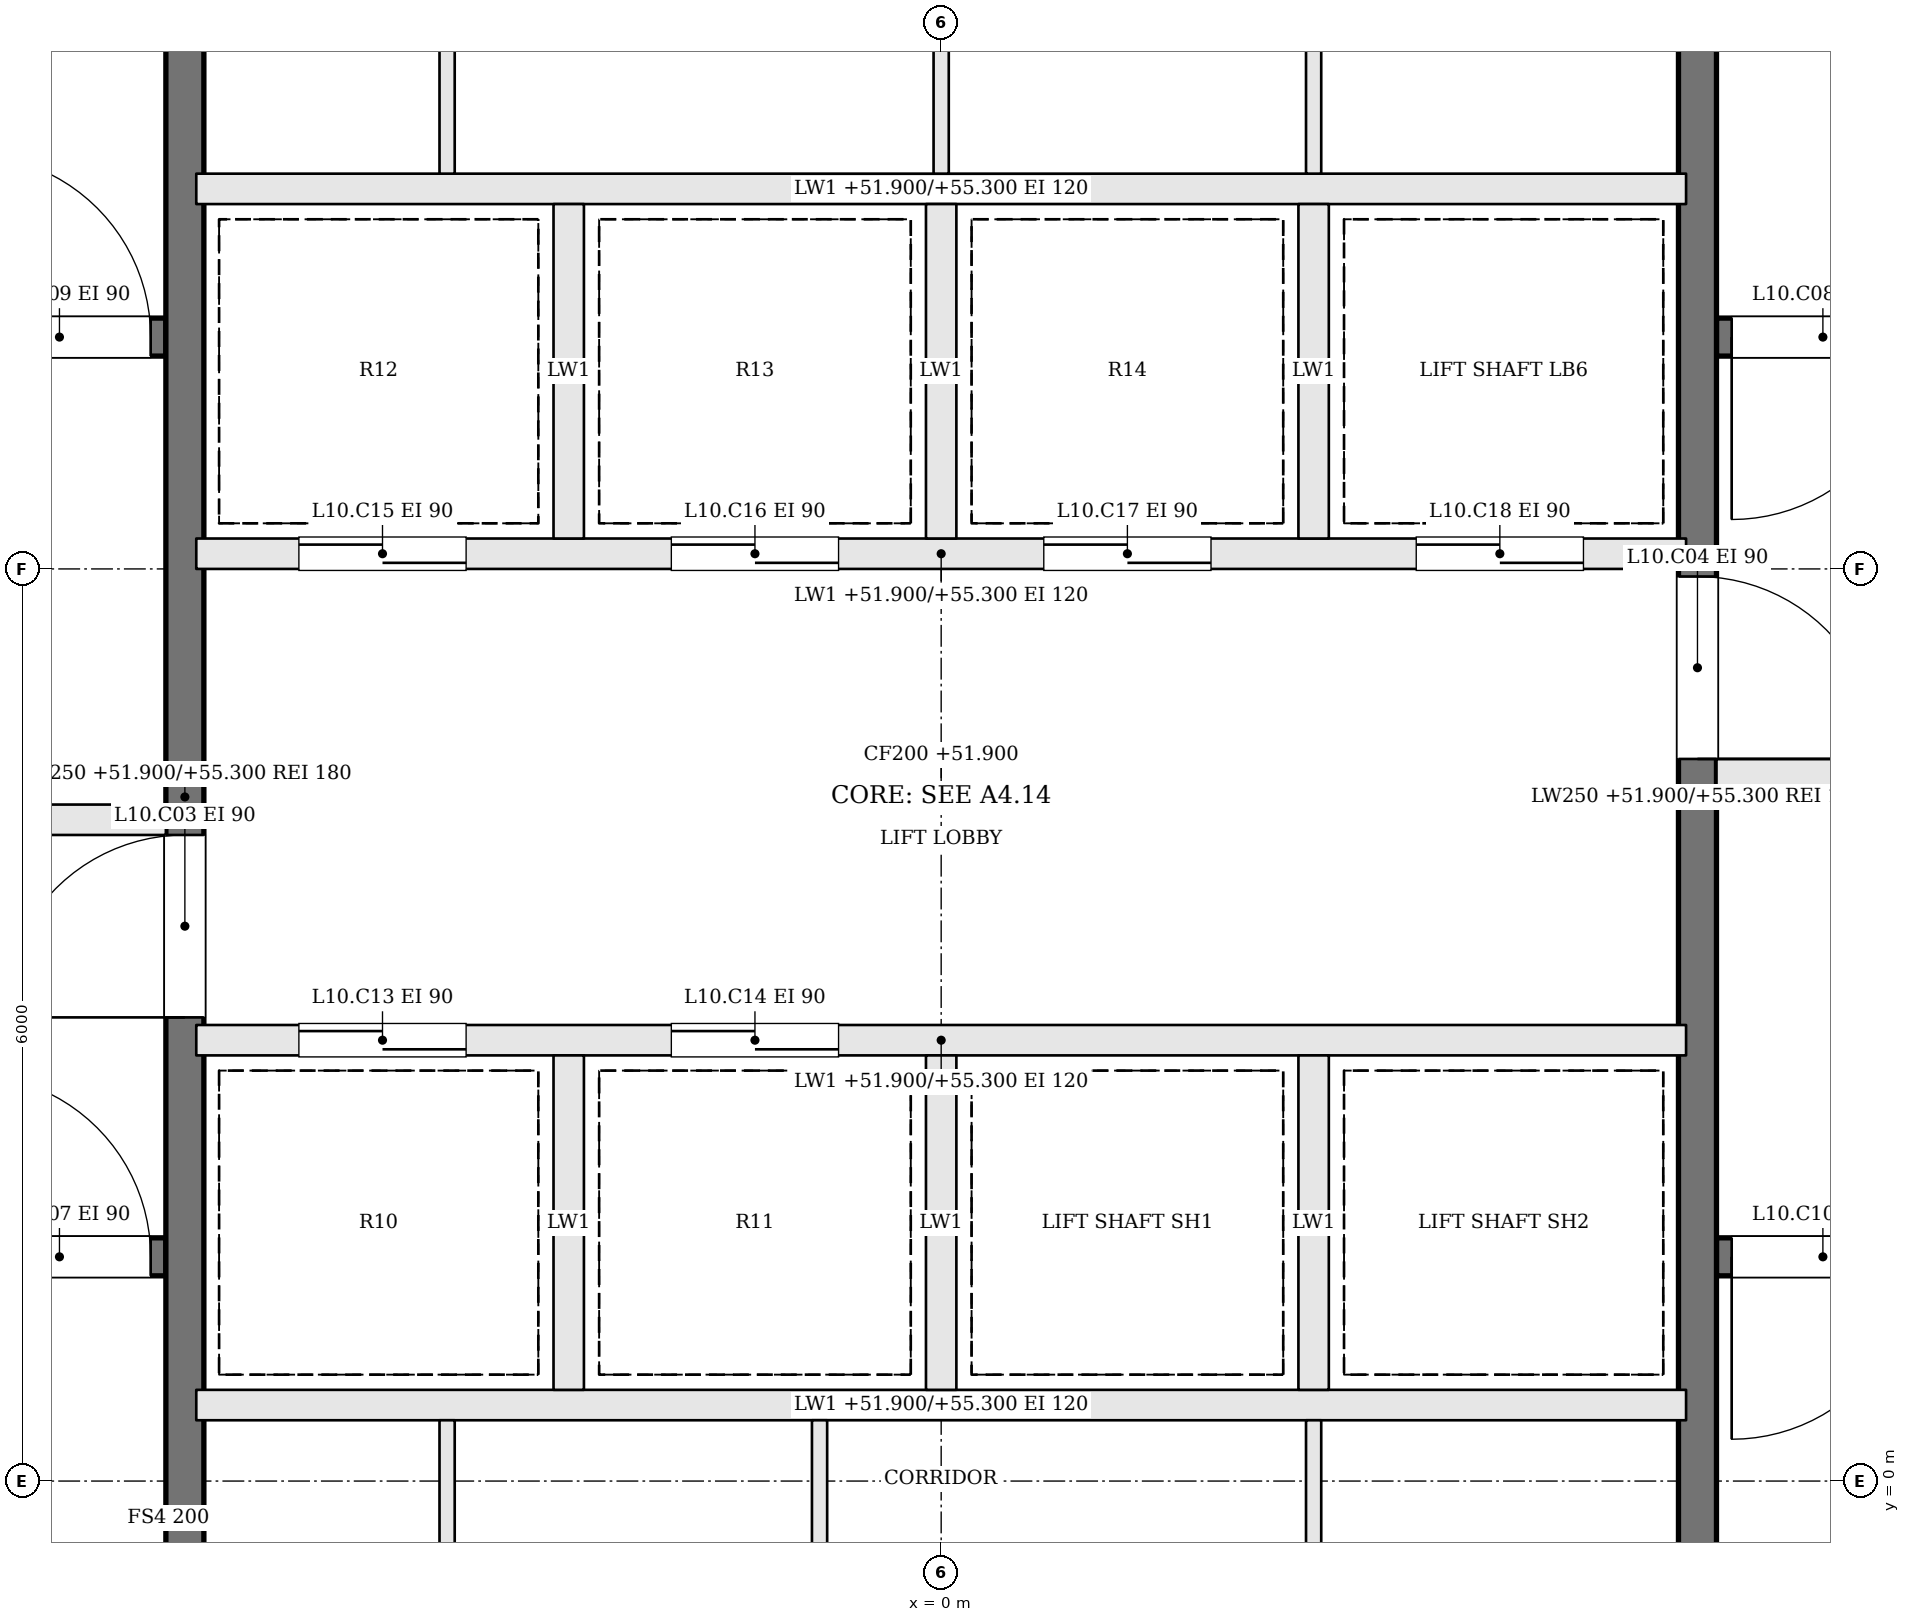
"""IFC4 building model, lengths in metres.
Left out: names, types, materials, properties, quantities, classifications, styles, units other than length and angle.
Written with IfcOpenShell. Run it as: python <this file> out.ifc"""

import sys

from ifc_helpers import new_model, si_unit, direction, frame, frame_2d, origin, place, context, subcontext, project, spatial, rectangle, extrude, element, fill, save


model = new_model("IFC4")
c1 = context("Model", 3, precision=1e-05, world=origin(), true_north=direction((0.0, 1.0)))
c2 = subcontext(c1, "Body", "Model", "MODEL_VIEW")
j1 = project(units=[si_unit("LENGTHUNIT", "METRE"), si_unit("PLANEANGLEUNIT", "RADIAN")], contexts=[c1])
p1 = place(None, origin())
s1 = spatial("IfcSite", under=j1, at=p1, CompositionType="ELEMENT")
p2 = place(p1, origin())
s2 = spatial("IfcBuilding", under=s1, at=p2, CompositionType="ELEMENT")
p3 = place(p2, frame((0.0, 0.0, 51.9)))
s3 = spatial("IfcBuildingStorey", under=s2, at=p3, CompositionType="ELEMENT", Elevation=51.9)
p4 = place(p3, frame((-11.6, 1.475, 0.0), z_axis=(0.0, 0.0, 1.0), x_axis=(1.0, 0.0, 0.0)))
e1 = element("IfcWall", 1, at=p4, inside=s3, PredefinedType="SOLIDWALL", context=c2, shape_type="SweptSolid", body=[
    extrude(rectangle(XDim=6.5, YDim=0.25, at=frame_2d((3.25, 0.0))), origin(), (0.0, 0.0, 1.0), 3.4),
])
p5 = place(p4, frame((5.2, 0.0, 0.0)))
e2 = element("IfcOpeningElement", 2, at=p5, cuts=e1, PredefinedType="OPENING", context=c2, shape_type="SweptSolid", body=[
    extrude(rectangle(XDim=1.2, YDim=2.1, at=frame_2d((0.6, 1.05))), frame((0.0, 0.135, 0.0), z_axis=(0.0, -1.0, 0.0), x_axis=(1.0, 0.0, 0.0)), (0.0, 0.0, 1.0), 0.27),
])
p6 = place(p3, frame((11.6, 7.525, 0.0), z_axis=(0.0, 0.0, 1.0), x_axis=(-1.0, 0.0, 0.0)))
e3 = element("IfcWall", 3, at=p6, inside=s3, PredefinedType="SOLIDWALL", context=c2, shape_type="SweptSolid", body=[
    extrude(rectangle(XDim=6.5, YDim=0.25, at=frame_2d((3.25, 0.0))), origin(), (0.0, 0.0, 1.0), 3.4),
])
p7 = place(p6, frame((5.2, 0.0, 0.0)))
e4 = element("IfcOpeningElement", 4, at=p7, cuts=e3, PredefinedType="OPENING", context=c2, shape_type="SweptSolid", body=[
    extrude(rectangle(XDim=1.2, YDim=2.1, at=frame_2d((0.6, 1.05))), frame((0.0, 0.135, 0.0), z_axis=(0.0, -1.0, 0.0), x_axis=(1.0, 0.0, 0.0)), (0.0, 0.0, 1.0), 0.27),
])
p8 = place(p3, frame((-11.6, 4.35, 0.0), z_axis=(0.0, 0.0, 1.0), x_axis=(1.0, 0.0, 0.0)))
e5 = element("IfcWall", 5, at=p8, inside=s3, PredefinedType="SOLIDWALL", context=c2, shape_type="SweptSolid", body=[
    extrude(rectangle(XDim=6.5, YDim=0.2, at=frame_2d((3.25, 0.0))), origin(), (0.0, 0.0, 1.0), 3.4),
])
p9 = place(p8, frame((3.8, 0.0, 0.0)))
e6 = element("IfcOpeningElement", 6, at=p9, cuts=e5, PredefinedType="OPENING", context=c2, shape_type="SweptSolid", body=[
    extrude(rectangle(XDim=1.2, YDim=2.1, at=frame_2d((0.6, 1.05))), frame((0.0, 0.11, 0.0), z_axis=(0.0, -1.0, 0.0), x_axis=(1.0, 0.0, 0.0)), (0.0, 0.0, 1.0), 0.22),
])
p10 = place(p8, frame((0.5, 0.0, 0.0)))
e7 = element("IfcOpeningElement", 7, at=p10, cuts=e5, PredefinedType="OPENING", context=c2, shape_type="SweptSolid", body=[
    extrude(rectangle(XDim=1.2, YDim=2.1, at=frame_2d((0.6, 1.05))), frame((0.0, 0.11, 0.0), z_axis=(0.0, -1.0, 0.0), x_axis=(1.0, 0.0, 0.0)), (0.0, 0.0, 1.0), 0.22),
])
p11 = place(p3, frame((11.6, 4.65, 0.0), z_axis=(0.0, 0.0, 1.0), x_axis=(-1.0, 0.0, 0.0)))
e8 = element("IfcWall", 8, at=p11, inside=s3, PredefinedType="SOLIDWALL", context=c2, shape_type="SweptSolid", body=[
    extrude(rectangle(XDim=6.5, YDim=0.2, at=frame_2d((3.25, 0.0))), origin(), (0.0, 0.0, 1.0), 3.4),
])
p12 = place(p11, frame((3.8, 0.0, 0.0)))
e9 = element("IfcOpeningElement", 9, at=p12, cuts=e8, PredefinedType="OPENING", context=c2, shape_type="SweptSolid", body=[
    extrude(rectangle(XDim=1.2, YDim=2.1, at=frame_2d((0.6, 1.05))), frame((0.0, 0.11, 0.0), z_axis=(0.0, -1.0, 0.0), x_axis=(1.0, 0.0, 0.0)), (0.0, 0.0, 1.0), 0.22),
])
p13 = place(p11, frame((0.5, 0.0, 0.0)))
e10 = element("IfcOpeningElement", 10, at=p13, cuts=e8, PredefinedType="OPENING", context=c2, shape_type="SweptSolid", body=[
    extrude(rectangle(XDim=1.2, YDim=2.1, at=frame_2d((0.6, 1.05))), frame((0.0, 0.11, 0.0), z_axis=(0.0, -1.0, 0.0), x_axis=(1.0, 0.0, 0.0)), (0.0, 0.0, 1.0), 0.22),
])
p14 = place(p3, frame((-11.6, 7.525, 0.0), z_axis=(0.0, 0.0, 1.0), x_axis=(1.0, 0.0, 0.0)))
e11 = element("IfcWall", 11, at=p14, inside=s3, PredefinedType="SOLIDWALL", context=c2, shape_type="SweptSolid", body=[
    extrude(rectangle(XDim=6.5, YDim=0.25, at=frame_2d((3.25, 0.0))), origin(), (0.0, 0.0, 1.0), 3.4),
])
p15 = place(p14, frame((5.2, 0.0, 0.0)))
e12 = element("IfcOpeningElement", 12, at=p15, cuts=e11, PredefinedType="OPENING", context=c2, shape_type="SweptSolid", body=[
    extrude(rectangle(XDim=1.2, YDim=2.1, at=frame_2d((0.6, 1.05))), frame((0.0, 0.135, 0.0), z_axis=(0.0, -1.0, 0.0), x_axis=(1.0, 0.0, 0.0)), (0.0, 0.0, 1.0), 0.27),
])
p16 = place(p3, frame((11.6, 1.475, 0.0), z_axis=(0.0, 0.0, 1.0), x_axis=(-1.0, 0.0, 0.0)))
e13 = element("IfcWall", 13, at=p16, inside=s3, PredefinedType="SOLIDWALL", context=c2, shape_type="SweptSolid", body=[
    extrude(rectangle(XDim=6.5, YDim=0.25, at=frame_2d((3.25, 0.0))), origin(), (0.0, 0.0, 1.0), 3.4),
])
p17 = place(p16, frame((5.2, 0.0, 0.0)))
e14 = element("IfcOpeningElement", 14, at=p17, cuts=e13, PredefinedType="OPENING", context=c2, shape_type="SweptSolid", body=[
    extrude(rectangle(XDim=1.2, YDim=2.1, at=frame_2d((0.6, 1.05))), frame((0.0, 0.135, 0.0), z_axis=(0.0, -1.0, 0.0), x_axis=(1.0, 0.0, 0.0)), (0.0, 0.0, 1.0), 0.27),
])
p18 = place(p3, frame((-4.975, -1.6, 0.0), z_axis=(0.0, 0.0, 1.0), x_axis=(0.0, 1.0, 0.0)))
e15 = element("IfcWall", 15, at=p18, inside=s3, PredefinedType="SOLIDWALL", context=c2, shape_type="SweptSolid", body=[
    extrude(rectangle(XDim=12.2, YDim=0.25, at=frame_2d((6.1, 0.0))), origin(), (0.0, 0.0, 1.0), 3.4),
])
p19 = place(p18, frame((4.65, 0.0, 0.0)))
e16 = element("IfcOpeningElement", 16, at=p19, cuts=e15, PredefinedType="OPENING", context=c2, shape_type="SweptSolid", body=[
    extrude(rectangle(XDim=1.2, YDim=2.1, at=frame_2d((0.6, 1.05))), frame((0.0, 0.135, 0.0), z_axis=(0.0, -1.0, 0.0), x_axis=(1.0, 0.0, 0.0)), (0.0, 0.0, 1.0), 0.27),
])
p20 = place(p3, frame((4.975, 10.6, 0.0), z_axis=(0.0, 0.0, 1.0), x_axis=(0.0, -1.0, 0.0)))
e17 = element("IfcWall", 17, at=p20, inside=s3, PredefinedType="SOLIDWALL", context=c2, shape_type="SweptSolid", body=[
    extrude(rectangle(XDim=12.2, YDim=0.25, at=frame_2d((6.1, 0.0))), origin(), (0.0, 0.0, 1.0), 3.4),
])
p21 = place(p20, frame((4.65, 0.0, 0.0)))
e18 = element("IfcOpeningElement", 18, at=p21, cuts=e17, PredefinedType="OPENING", context=c2, shape_type="SweptSolid", body=[
    extrude(rectangle(XDim=1.2, YDim=2.1, at=frame_2d((0.6, 1.05))), frame((0.0, 0.135, 0.0), z_axis=(0.0, -1.0, 0.0), x_axis=(1.0, 0.0, 0.0)), (0.0, 0.0, 1.0), 0.27),
])
p22 = place(p3, frame((-4.9, 0.5, 0.0), z_axis=(0.0, 0.0, 1.0), x_axis=(1.0, 0.0, 0.0)))
e19 = element("IfcWall", 19, at=p22, inside=s3, PredefinedType="SOLIDWALL", context=c2, shape_type="SweptSolid", body=[
    extrude(rectangle(XDim=9.8, YDim=0.2, at=frame_2d((4.9, 0.0))), origin(), (0.0, 0.0, 1.0), 3.4),
])
p23 = place(p3, frame((-4.9, 2.9, 0.0), z_axis=(0.0, 0.0, 1.0), x_axis=(1.0, 0.0, 0.0)))
e20 = element("IfcWall", 20, at=p23, inside=s3, PredefinedType="SOLIDWALL", context=c2, shape_type="SweptSolid", body=[
    extrude(rectangle(XDim=9.8, YDim=0.2, at=frame_2d((4.9, 0.0))), origin(), (0.0, 0.0, 1.0), 3.4),
])
p24 = place(p23, frame((0.675, 0.0, 0.0)))
e21 = element("IfcOpeningElement", 21, at=p24, cuts=e20, PredefinedType="OPENING", context=c2, shape_type="SweptSolid", body=[
    extrude(rectangle(XDim=1.1, YDim=2.1, at=frame_2d((0.55, 1.05))), frame((0.0, 0.11, 0.0), z_axis=(0.0, -1.0, 0.0), x_axis=(1.0, 0.0, 0.0)), (0.0, 0.0, 1.0), 0.22),
])
p25 = place(p23, frame((3.125, 0.0, 0.0)))
e22 = element("IfcOpeningElement", 22, at=p25, cuts=e20, PredefinedType="OPENING", context=c2, shape_type="SweptSolid", body=[
    extrude(rectangle(XDim=1.1, YDim=2.1, at=frame_2d((0.55, 1.05))), frame((0.0, 0.11, 0.0), z_axis=(0.0, -1.0, 0.0), x_axis=(1.0, 0.0, 0.0)), (0.0, 0.0, 1.0), 0.22),
])
p26 = place(p3, frame((-4.9, 6.1, 0.0), z_axis=(0.0, 0.0, 1.0), x_axis=(1.0, 0.0, 0.0)))
e23 = element("IfcWall", 23, at=p26, inside=s3, PredefinedType="SOLIDWALL", context=c2, shape_type="SweptSolid", body=[
    extrude(rectangle(XDim=9.8, YDim=0.2, at=frame_2d((4.9, 0.0))), origin(), (0.0, 0.0, 1.0), 3.4),
])
p27 = place(p26, frame((0.675, 0.0, 0.0)))
e24 = element("IfcOpeningElement", 24, at=p27, cuts=e23, PredefinedType="OPENING", context=c2, shape_type="SweptSolid", body=[
    extrude(rectangle(XDim=1.1, YDim=2.1, at=frame_2d((0.55, 1.05))), frame((0.0, 0.11, 0.0), z_axis=(0.0, -1.0, 0.0), x_axis=(1.0, 0.0, 0.0)), (0.0, 0.0, 1.0), 0.22),
])
p28 = place(p26, frame((3.125, 0.0, 0.0)))
e25 = element("IfcOpeningElement", 25, at=p28, cuts=e23, PredefinedType="OPENING", context=c2, shape_type="SweptSolid", body=[
    extrude(rectangle(XDim=1.1, YDim=2.1, at=frame_2d((0.55, 1.05))), frame((0.0, 0.11, 0.0), z_axis=(0.0, -1.0, 0.0), x_axis=(1.0, 0.0, 0.0)), (0.0, 0.0, 1.0), 0.22),
])
p29 = place(p26, frame((5.575, 0.0, 0.0)))
e26 = element("IfcOpeningElement", 26, at=p29, cuts=e23, PredefinedType="OPENING", context=c2, shape_type="SweptSolid", body=[
    extrude(rectangle(XDim=1.1, YDim=2.1, at=frame_2d((0.55, 1.05))), frame((0.0, 0.11, 0.0), z_axis=(0.0, -1.0, 0.0), x_axis=(1.0, 0.0, 0.0)), (0.0, 0.0, 1.0), 0.22),
])
p30 = place(p26, frame((8.025, 0.0, 0.0)))
e27 = element("IfcOpeningElement", 27, at=p30, cuts=e23, PredefinedType="OPENING", context=c2, shape_type="SweptSolid", body=[
    extrude(rectangle(XDim=1.1, YDim=2.1, at=frame_2d((0.55, 1.05))), frame((0.0, 0.11, 0.0), z_axis=(0.0, -1.0, 0.0), x_axis=(1.0, 0.0, 0.0)), (0.0, 0.0, 1.0), 0.22),
])
p31 = place(p3, frame((-4.9, 8.5, 0.0), z_axis=(0.0, 0.0, 1.0), x_axis=(1.0, 0.0, 0.0)))
e28 = element("IfcWall", 28, at=p31, inside=s3, PredefinedType="SOLIDWALL", context=c2, shape_type="SweptSolid", body=[
    extrude(rectangle(XDim=9.8, YDim=0.2, at=frame_2d((4.9, 0.0))), origin(), (0.0, 0.0, 1.0), 3.4),
])
for number, where, z_axis, x_axis in (
    (29, (-2.45, 0.6, 0.0), (0.0, 0.0, 1.0), (0.0, 1.0, 0.0)),
    (30, (0.0, 0.6, 0.0), (0.0, 0.0, 1.0), (0.0, 1.0, 0.0)),
    (31, (2.45, 0.6, 0.0), (0.0, 0.0, 1.0), (0.0, 1.0, 0.0)),
    (32, (-2.45, 6.2, 0.0), (0.0, 0.0, 1.0), (0.0, 1.0, 0.0)),
    (33, (0.0, 6.2, 0.0), (0.0, 0.0, 1.0), (0.0, 1.0, 0.0)),
    (34, (2.45, 6.2, 0.0), (0.0, 0.0, 1.0), (0.0, 1.0, 0.0)),
):
    element("IfcWall", number, at=place(p3, frame(where, z_axis=z_axis, x_axis=x_axis)), inside=s3, PredefinedType="SOLIDWALL", context=c2, shape_type="SweptSolid", body=[
        extrude(rectangle(XDim=2.2, YDim=0.2, at=frame_2d((1.1, 0.0))), origin(), (0.0, 0.0, 1.0), 3.4),
    ])
for number, where, z_axis, x_axis in (
    (35, (-3.25, -1.6, 0.0), (0.0, 0.0, 1.0), (0.0, 1.0, 0.0)),
    (36, (-0.8, -1.6, 0.0), (0.0, 0.0, 1.0), (0.0, 1.0, 0.0)),
    (37, (2.45, -1.6, 0.0), (0.0, 0.0, 1.0), (0.0, 1.0, 0.0)),
    (38, (-3.25, 8.6, 0.0), (0.0, 0.0, 1.0), (0.0, 1.0, 0.0)),
    (39, (0.0, 8.6, 0.0), (0.0, 0.0, 1.0), (0.0, 1.0, 0.0)),
    (40, (2.45, 8.6, 0.0), (0.0, 0.0, 1.0), (0.0, 1.0, 0.0)),
):
    element("IfcWall", number, at=place(p3, frame(where, z_axis=z_axis, x_axis=x_axis)), inside=s3, PredefinedType="PARTITIONING", context=c2, shape_type="SweptSolid", body=[
        extrude(rectangle(XDim=2.0, YDim=0.1, at=frame_2d((1.0, 0.0))), origin(), (0.0, 0.0, 1.0), 3.4),
    ])
p32 = place(p19, origin())
e41 = element("IfcDoor", 41, at=p32, inside=s3, OperationType="SINGLE_SWING_LEFT", PredefinedType="DOOR", context=c2, shape_type="SweptSolid", body=[
    extrude(rectangle(XDim=1.2, YDim=2.1, at=frame_2d((0.6, 1.05))), frame((0.0, 0.025, 0.0), z_axis=(0.0, -1.0, 0.0), x_axis=(1.0, 0.0, 0.0)), (0.0, 0.0, 1.0), 0.05),
])
fill(e16, e41)
p33 = place(p21, origin())
e42 = element("IfcDoor", 42, at=p33, inside=s3, OperationType="SINGLE_SWING_RIGHT", PredefinedType="DOOR", context=c2, shape_type="SweptSolid", body=[
    extrude(rectangle(XDim=1.2, YDim=2.1, at=frame_2d((0.6, 1.05))), frame((0.0, 0.025, 0.0), z_axis=(0.0, -1.0, 0.0), x_axis=(1.0, 0.0, 0.0)), (0.0, 0.0, 1.0), 0.05),
])
fill(e18, e42)
p34 = place(p5, origin())
e43 = element("IfcDoor", 43, at=p34, inside=s3, OperationType="SINGLE_SWING_LEFT", PredefinedType="DOOR", context=c2, shape_type="SweptSolid", body=[
    extrude(rectangle(XDim=1.2, YDim=2.1, at=frame_2d((0.6, 1.05))), frame((0.0, 0.025, 0.0), z_axis=(0.0, -1.0, 0.0), x_axis=(1.0, 0.0, 0.0)), (0.0, 0.0, 1.0), 0.05),
])
fill(e2, e43)
p35 = place(p7, origin())
e44 = element("IfcDoor", 44, at=p35, inside=s3, OperationType="SINGLE_SWING_RIGHT", PredefinedType="DOOR", context=c2, shape_type="SweptSolid", body=[
    extrude(rectangle(XDim=1.2, YDim=2.1, at=frame_2d((0.6, 1.05))), frame((0.0, 0.025, 0.0), z_axis=(0.0, -1.0, 0.0), x_axis=(1.0, 0.0, 0.0)), (0.0, 0.0, 1.0), 0.05),
])
fill(e4, e44)
p36 = place(p15, origin())
e45 = element("IfcDoor", 45, at=p36, inside=s3, OperationType="SINGLE_SWING_LEFT", PredefinedType="DOOR", context=c2, shape_type="SweptSolid", body=[
    extrude(rectangle(XDim=1.2, YDim=2.1, at=frame_2d((0.6, 1.05))), frame((0.0, 0.025, 0.0), z_axis=(0.0, -1.0, 0.0), x_axis=(1.0, 0.0, 0.0)), (0.0, 0.0, 1.0), 0.05),
])
fill(e12, e45)
p37 = place(p17, origin())
e46 = element("IfcDoor", 46, at=p37, inside=s3, OperationType="SINGLE_SWING_RIGHT", PredefinedType="DOOR", context=c2, shape_type="SweptSolid", body=[
    extrude(rectangle(XDim=1.2, YDim=2.1, at=frame_2d((0.6, 1.05))), frame((0.0, 0.025, 0.0), z_axis=(0.0, -1.0, 0.0), x_axis=(1.0, 0.0, 0.0)), (0.0, 0.0, 1.0), 0.05),
])
fill(e14, e46)
p38 = place(p24, origin())
e47 = element("IfcDoor", 47, at=p38, inside=s3, OperationType="SLIDING_TO_RIGHT", PredefinedType="DOOR", context=c2, shape_type="SweptSolid", body=[
    extrude(rectangle(XDim=1.1, YDim=2.1, at=frame_2d((0.55, 1.05))), frame((0.0, 0.025, 0.0), z_axis=(0.0, -1.0, 0.0), x_axis=(1.0, 0.0, 0.0)), (0.0, 0.0, 1.0), 0.05),
])
fill(e21, e47)
p39 = place(p25, origin())
e48 = element("IfcDoor", 48, at=p39, inside=s3, OperationType="SLIDING_TO_LEFT", PredefinedType="DOOR", context=c2, shape_type="SweptSolid", body=[
    extrude(rectangle(XDim=1.1, YDim=2.1, at=frame_2d((0.55, 1.05))), frame((0.0, 0.025, 0.0), z_axis=(0.0, -1.0, 0.0), x_axis=(1.0, 0.0, 0.0)), (0.0, 0.0, 1.0), 0.05),
])
fill(e22, e48)
p40 = place(p27, origin())
e49 = element("IfcDoor", 49, at=p40, inside=s3, OperationType="SLIDING_TO_RIGHT", PredefinedType="DOOR", context=c2, shape_type="SweptSolid", body=[
    extrude(rectangle(XDim=1.1, YDim=2.1, at=frame_2d((0.55, 1.05))), frame((0.0, 0.025, 0.0), z_axis=(0.0, -1.0, 0.0), x_axis=(1.0, 0.0, 0.0)), (0.0, 0.0, 1.0), 0.05),
])
fill(e24, e49)
p41 = place(p28, origin())
e50 = element("IfcDoor", 50, at=p41, inside=s3, OperationType="SLIDING_TO_LEFT", PredefinedType="DOOR", context=c2, shape_type="SweptSolid", body=[
    extrude(rectangle(XDim=1.1, YDim=2.1, at=frame_2d((0.55, 1.05))), frame((0.0, 0.025, 0.0), z_axis=(0.0, -1.0, 0.0), x_axis=(1.0, 0.0, 0.0)), (0.0, 0.0, 1.0), 0.05),
])
fill(e25, e50)
p42 = place(p29, origin())
e51 = element("IfcDoor", 51, at=p42, inside=s3, OperationType="SLIDING_TO_RIGHT", PredefinedType="DOOR", context=c2, shape_type="SweptSolid", body=[
    extrude(rectangle(XDim=1.1, YDim=2.1, at=frame_2d((0.55, 1.05))), frame((0.0, 0.025, 0.0), z_axis=(0.0, -1.0, 0.0), x_axis=(1.0, 0.0, 0.0)), (0.0, 0.0, 1.0), 0.05),
])
fill(e26, e51)
p43 = place(p30, origin())
e52 = element("IfcDoor", 52, at=p43, inside=s3, OperationType="SLIDING_TO_LEFT", PredefinedType="DOOR", context=c2, shape_type="SweptSolid", body=[
    extrude(rectangle(XDim=1.1, YDim=2.1, at=frame_2d((0.55, 1.05))), frame((0.0, 0.025, 0.0), z_axis=(0.0, -1.0, 0.0), x_axis=(1.0, 0.0, 0.0)), (0.0, 0.0, 1.0), 0.05),
])
fill(e27, e52)
save(model, sys.argv[1])
